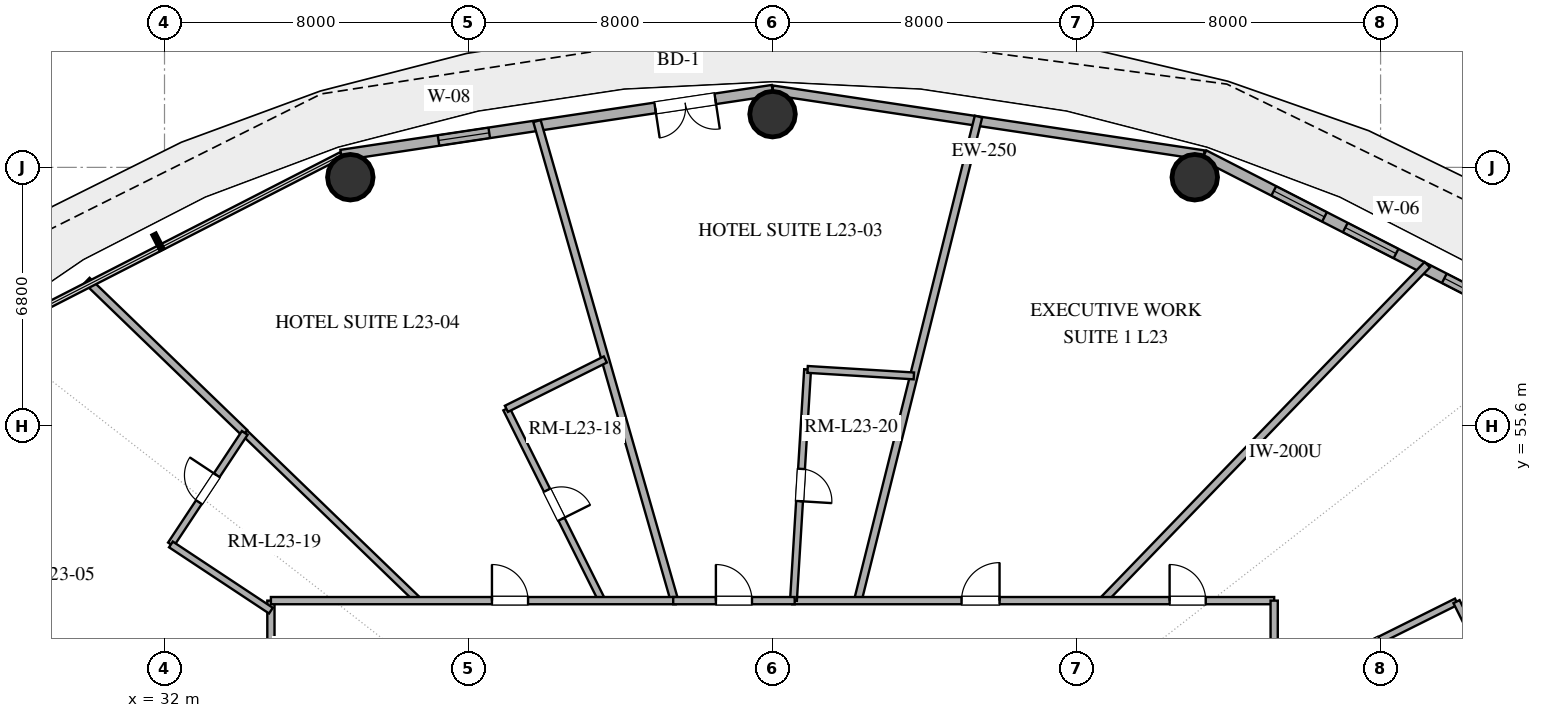
"""IFC4 building model, lengths in metres.
Left out: names, types, materials, properties, quantities, classifications, styles, units other than length and angle.
Written with IfcOpenShell. Run it as: python <this file> out.ifc"""

import sys

from ifc_helpers import new_model, si_unit, direction, frame, frame_2d, origin, origin_2d, place, context, subcontext, project, spatial, rectangle, hollow_circle, extrude, element, fill, save


model = new_model("IFC4")
c1 = context("Model", 3, precision=1e-05, world=origin(), true_north=direction((0.0, 1.0)))
c2 = subcontext(c1, "Body", "Model", "MODEL_VIEW")
j1 = project(units=[si_unit("LENGTHUNIT", "METRE"), si_unit("PLANEANGLEUNIT", "RADIAN")], contexts=[c1])
p1 = place(None, origin())
s1 = spatial("IfcSite", under=j1, at=p1, CompositionType="ELEMENT")
p2 = place(p1, origin())
s2 = spatial("IfcBuilding", under=s1, at=p2, CompositionType="ELEMENT")
p3 = place(p2, frame((0.0, 0.0, 94.8)))
s3 = spatial("IfcBuildingStorey", under=s2, at=p3, CompositionType="ELEMENT", Elevation=94.8)
for number, where, z_axis, x_axis in (
    (1, (59.11, 62.141, 0.0), (0.0, 0.0, 1.0), (1.0, 0.0, 0.0)),
    (2, (48.0, 63.8, 0.0), (0.0, 0.0, 1.0), (1.0, 0.0, 0.0)),
    (3, (36.89, 62.141, 0.0), (0.0, 0.0, 1.0), (1.0, 0.0, 0.0)),
):
    element("IfcColumn", number, at=place(p3, frame(where, z_axis=z_axis, x_axis=x_axis)), inside=s3, PredefinedType="COLUMN", context=c2, shape_type="SweptSolid", body=[
        extrude(hollow_circle(Radius=0.6, WallThickness=0.032, at=origin_2d()), origin(), (0.0, 0.0, 1.0), 3.38),
    ])
p4 = place(p3, frame((68.84, 57.86, 0.0), z_axis=(0.0, 0.0, 1.0), x_axis=(-0.889959505023, 0.45603955905, 0.0)))
e4 = element("IfcWall", 4, at=p4, inside=s3, PredefinedType="SOLIDWALL", context=c2, shape_type="SweptSolid", body=[
    extrude(rectangle(XDim=10.662, YDim=0.28, at=frame_2d((5.331, 0.0))), origin(), (0.0, 0.0, 1.0), 3.38),
])
p5 = place(p4, frame((1.904, 0.0, 0.85)))
e5 = element("IfcOpeningElement", 5, at=p5, cuts=e4, PredefinedType="OPENING", context=c2, shape_type="SweptSolid", body=[
    extrude(rectangle(XDim=1.65, YDim=2.0, at=frame_2d((0.825, 1.0))), frame((0.0, 0.15, 0.0), z_axis=(0.0, -1.0, 0.0), x_axis=(1.0, 0.0, 0.0)), (0.0, 0.0, 1.0), 0.3),
])
p6 = place(p4, frame((4.982, 0.0, 0.85)))
e6 = element("IfcOpeningElement", 6, at=p6, cuts=e4, PredefinedType="OPENING", context=c2, shape_type="SweptSolid", body=[
    extrude(rectangle(XDim=1.5, YDim=2.0, at=frame_2d((0.75, 1.0))), frame((0.0, 0.15, 0.0), z_axis=(0.0, -1.0, 0.0), x_axis=(1.0, 0.0, 0.0)), (0.0, 0.0, 1.0), 0.3),
])
p7 = place(p4, frame((7.096, 0.0, 0.85)))
e7 = element("IfcOpeningElement", 7, at=p7, cuts=e4, PredefinedType="OPENING", context=c2, shape_type="SweptSolid", body=[
    extrude(rectangle(XDim=1.5, YDim=2.0, at=frame_2d((0.75, 1.0))), frame((0.0, 0.15, 0.0), z_axis=(0.0, -1.0, 0.0), x_axis=(1.0, 0.0, 0.0)), (0.0, 0.0, 1.0), 0.3),
])
p8 = place(p3, frame((59.351, 62.723, 0.0), z_axis=(0.0, 0.0, 1.0), x_axis=(-0.988877774656, 0.148730450117, 0.0)))
e8 = element("IfcWall", 8, at=p8, inside=s3, PredefinedType="SOLIDWALL", context=c2, shape_type="SweptSolid", body=[
    extrude(rectangle(XDim=11.479, YDim=0.25, at=frame_2d((5.74, 0.0))), origin(), (0.0, 0.0, 1.0), 3.38),
])
p9 = place(p3, frame((48.0, 64.43, 0.0), z_axis=(0.0, 0.0, 1.0), x_axis=(-0.988877774656, -0.148730450117, 0.0)))
e9 = element("IfcWall", 9, at=p9, inside=s3, PredefinedType="SOLIDWALL", context=c2, shape_type="SweptSolid", body=[
    extrude(rectangle(XDim=11.479, YDim=0.28, at=frame_2d((5.74, 0.0))), origin(), (0.0, 0.0, 1.0), 3.38),
])
p10 = place(p9, frame((1.524, 0.0, 0.0)))
e10 = element("IfcOpeningElement", 10, at=p10, cuts=e9, PredefinedType="OPENING", context=c2, shape_type="SweptSolid", body=[
    extrude(rectangle(XDim=1.6, YDim=2.25, at=frame_2d((0.8, 1.125))), frame((0.0, 0.15, 0.0), z_axis=(0.0, -1.0, 0.0), x_axis=(1.0, 0.0, 0.0)), (0.0, 0.0, 1.0), 0.3),
])
p11 = place(p9, frame((7.539, 0.0, 0.85)))
e11 = element("IfcOpeningElement", 11, at=p11, cuts=e9, PredefinedType="OPENING", context=c2, shape_type="SweptSolid", body=[
    extrude(rectangle(XDim=1.35, YDim=1.8, at=frame_2d((0.675, 0.9))), frame((0.0, 0.15, 0.0), z_axis=(0.0, -1.0, 0.0), x_axis=(1.0, 0.0, 0.0)), (0.0, 0.0, 1.0), 0.3),
])
p12 = place(p3, frame((65.228, 59.84, 0.0), z_axis=(0.0, 0.0, 1.0), x_axis=(-0.694672506389, -0.719326149161, 0.0)))
e12 = element("IfcWall", 12, at=p12, inside=s3, PredefinedType="PARTITIONING", context=c2, shape_type="SweptSolid", body=[
    extrude(rectangle(XDim=12.289, YDim=0.2, at=frame_2d((6.145, 0.0))), origin(), (0.0, 0.0, 1.0), 2.74),
])
p13 = place(p3, frame((50.244, 51.0, 0.0), z_axis=(0.0, 0.0, 1.0), x_axis=(0.241918476077, 0.970296578852, 0.0)))
e13 = element("IfcWall", 13, at=p13, inside=s3, PredefinedType="PARTITIONING", context=c2, shape_type="SweptSolid", body=[
    extrude(rectangle(XDim=13.125, YDim=0.2, at=frame_2d((6.563, 0.0))), origin(), (0.0, 0.0, 1.0), 2.74),
])
p14 = place(p3, frame((45.419, 51.0, 0.0), z_axis=(0.0, 0.0, 1.0), x_axis=(-0.275639731411, 0.961261014745, 0.0)))
e14 = element("IfcWall", 14, at=p14, inside=s3, PredefinedType="PARTITIONING", context=c2, shape_type="SweptSolid", body=[
    extrude(rectangle(XDim=13.126, YDim=0.2, at=frame_2d((6.563, 0.0))), origin(), (0.0, 0.0, 1.0), 2.74),
])
p15 = place(p3, frame((48.518, 51.0, 0.0), z_axis=(0.0, 0.0, 1.0), x_axis=(1.0, 0.0, 0.0)))
e15 = element("IfcWall", 15, at=p15, inside=s3, PredefinedType="PARTITIONING", context=c2, shape_type="SweptSolid", body=[
    extrude(rectangle(XDim=12.682, YDim=0.19, at=frame_2d((6.341, 0.0))), origin(), (0.0, 0.0, 1.0), 2.74),
])
p16 = place(p15, frame((4.455, 0.0, 0.0)))
e16 = element("IfcOpeningElement", 16, at=p16, cuts=e15, PredefinedType="OPENING", context=c2, shape_type="SweptSolid", body=[
    extrude(rectangle(XDim=1.0, YDim=2.2, at=frame_2d((0.5, 1.1))), frame((0.0, 0.105, 0.0), z_axis=(0.0, -1.0, 0.0), x_axis=(1.0, 0.0, 0.0)), (0.0, 0.0, 1.0), 0.21),
])
p17 = place(p15, frame((9.93, 0.0, 0.0)))
e17 = element("IfcOpeningElement", 17, at=p17, cuts=e15, PredefinedType="OPENING", context=c2, shape_type="SweptSolid", body=[
    extrude(rectangle(XDim=0.95, YDim=2.15, at=frame_2d((0.475, 1.075))), frame((0.0, 0.105, 0.0), z_axis=(0.0, -1.0, 0.0), x_axis=(1.0, 0.0, 0.0)), (0.0, 0.0, 1.0), 0.21),
])
p18 = place(p3, frame((34.111, 55.413, 0.0), z_axis=(0.0, 0.0, 1.0), x_axis=(0.719318009274, -0.694680935059, 0.0)))
e18 = element("IfcWall", 18, at=p18, inside=s3, PredefinedType="PLUMBINGWALL", context=c2, shape_type="SweptSolid", body=[
    extrude(rectangle(XDim=6.352, YDim=0.18, at=frame_2d((3.176, 0.0))), origin(), (0.0, 0.0, 1.0), 2.74),
])
p19 = place(p3, frame((48.923, 57.084, 0.0), z_axis=(0.0, 0.0, 1.0), x_axis=(-0.061044096749, -0.998135070144, 0.0)))
e19 = element("IfcWall", 19, at=p19, inside=s3, PredefinedType="PLUMBINGWALL", context=c2, shape_type="SweptSolid", body=[
    extrude(rectangle(XDim=6.095, YDim=0.18, at=frame_2d((3.048, 0.0))), origin(), (0.0, 0.0, 1.0), 2.74),
])
p20 = place(p19, frame((2.623, 0.0, 0.0)))
e20 = element("IfcOpeningElement", 20, at=p20, cuts=e19, PredefinedType="OPENING", context=c2, shape_type="SweptSolid", body=[
    extrude(rectangle(XDim=0.85, YDim=2.1, at=frame_2d((0.425, 1.05))), frame((0.0, 0.1, 0.0), z_axis=(0.0, -1.0, 0.0), x_axis=(1.0, 0.0, 0.0)), (0.0, 0.0, 1.0), 0.2),
])
p21 = place(p3, frame((29.959, 59.422, 0.0), z_axis=(0.0, 0.0, 1.0), x_axis=(0.719370121813, -0.694626970281, 0.0)))
e21 = element("IfcWall", 21, at=p21, inside=s3, PredefinedType="PARTITIONING", context=c2, shape_type="SweptSolid", body=[
    extrude(rectangle(XDim=5.772, YDim=0.2, at=frame_2d((2.886, 0.0))), origin(), (0.0, 0.0, 1.0), 2.74),
])
p22 = place(p3, frame((40.997, 56.047, 0.0), z_axis=(0.0, 0.0, 1.0), x_axis=(0.446174269641, -0.894946099556, 0.0)))
e22 = element("IfcWall", 22, at=p22, inside=s3, PredefinedType="PLUMBINGWALL", context=c2, shape_type="SweptSolid", body=[
    extrude(rectangle(XDim=5.639, YDim=0.18, at=frame_2d((2.82, 0.0))), origin(), (0.0, 0.0, 1.0), 2.74),
])
p23 = place(p22, frame((2.395, 0.0, 0.0)))
e23 = element("IfcOpeningElement", 23, at=p23, cuts=e22, PredefinedType="OPENING", context=c2, shape_type="SweptSolid", body=[
    extrude(rectangle(XDim=0.85, YDim=2.1, at=frame_2d((0.425, 1.05))), frame((0.0, 0.1, 0.0), z_axis=(0.0, -1.0, 0.0), x_axis=(1.0, 0.0, 0.0)), (0.0, 0.0, 1.0), 0.2),
])
p24 = place(p3, frame((34.8, 42.775, 0.0), z_axis=(0.0, 0.0, 1.0), x_axis=(0.0, 1.0, 0.0)))
e24 = element("IfcWall", 24, at=p24, inside=s3, PredefinedType="PARTITIONING", context=c2, shape_type="SweptSolid", body=[
    extrude(rectangle(XDim=8.225, YDim=0.19, at=frame_2d((4.112, 0.0))), origin(), (0.0, 0.0, 1.0), 2.74),
])
p25 = place(p24, frame((4.767, 0.0, 0.0)))
e25 = element("IfcOpeningElement", 25, at=p25, cuts=e24, PredefinedType="OPENING", context=c2, shape_type="SweptSolid", body=[
    extrude(rectangle(XDim=0.95, YDim=2.15, at=frame_2d((0.475, 1.075))), frame((0.0, 0.105, 0.0), z_axis=(0.0, -1.0, 0.0), x_axis=(1.0, 0.0, 0.0)), (0.0, 0.0, 1.0), 0.21),
])
p26 = place(p3, frame((65.998, 50.973, 0.0), z_axis=(0.0, 0.0, 1.0), x_axis=(-0.894936648514, -0.446193226244, 0.0)))
e26 = element("IfcWall", 26, at=p26, inside=s3, PredefinedType="PLUMBINGWALL", context=c2, shape_type="SweptSolid", body=[
    extrude(rectangle(XDim=5.361, YDim=0.18, at=frame_2d((2.681, 0.0))), origin(), (0.0, 0.0, 1.0), 2.74),
])
p27 = place(p26, frame((2.256, 0.0, 0.0)))
e27 = element("IfcOpeningElement", 27, at=p27, cuts=e26, PredefinedType="OPENING", context=c2, shape_type="SweptSolid", body=[
    extrude(rectangle(XDim=0.85, YDim=2.1, at=frame_2d((0.425, 1.05))), frame((0.0, 0.1, 0.0), z_axis=(0.0, -1.0, 0.0), x_axis=(1.0, 0.0, 0.0)), (0.0, 0.0, 1.0), 0.2),
])
p28 = place(p3, frame((34.8, 51.0, 0.0), z_axis=(0.0, 0.0, 1.0), x_axis=(1.0, 0.0, 0.0)))
e28 = element("IfcWall", 28, at=p28, inside=s3, PredefinedType="PARTITIONING", context=c2, shape_type="SweptSolid", body=[
    extrude(rectangle(XDim=10.653, YDim=0.19, at=frame_2d((5.326, 0.0))), origin(), (0.0, 0.0, 1.0), 2.74),
])
p29 = place(p28, frame((5.816, 0.0, 0.0)))
e29 = element("IfcOpeningElement", 29, at=p29, cuts=e28, PredefinedType="OPENING", context=c2, shape_type="SweptSolid", body=[
    extrude(rectangle(XDim=0.95, YDim=2.15, at=frame_2d((0.475, 1.075))), frame((0.0, 0.105, 0.0), z_axis=(0.0, -1.0, 0.0), x_axis=(1.0, 0.0, 0.0)), (0.0, 0.0, 1.0), 0.21),
])
p30 = place(p3, frame((61.2, 51.0, 0.0), z_axis=(0.0, 0.0, 1.0), x_axis=(0.0, -1.0, 0.0)))
e30 = element("IfcWall", 30, at=p30, inside=s3, PredefinedType="PARTITIONING", context=c2, shape_type="SweptSolid", body=[
    extrude(rectangle(XDim=9.839, YDim=0.19, at=frame_2d((4.92, 0.0))), origin(), (0.0, 0.0, 1.0), 2.74),
])
p31 = place(p30, frame((7.035, 0.0, 0.0)))
e31 = element("IfcOpeningElement", 31, at=p31, cuts=e30, PredefinedType="OPENING", context=c2, shape_type="SweptSolid", body=[
    extrude(rectangle(XDim=0.95, YDim=2.15, at=frame_2d((0.475, 1.075))), frame((0.0, 0.105, 0.0), z_axis=(0.0, -1.0, 0.0), x_axis=(1.0, 0.0, 0.0)), (0.0, 0.0, 1.0), 0.21),
])
p32 = place(p3, frame((67.661, 47.638, 0.0), z_axis=(0.0, 0.0, 1.0), x_axis=(-0.446243949247, 0.894911357488, 0.0)))
e32 = element("IfcWall", 32, at=p32, inside=s3, PredefinedType="PLUMBINGWALL", context=c2, shape_type="SweptSolid", body=[
    extrude(rectangle(XDim=3.727, YDim=0.18, at=frame_2d((1.864, 0.0))), origin(), (0.0, 0.0, 1.0), 2.74),
])
p33 = place(p3, frame((32.169, 52.479, 0.0), z_axis=(0.0, 0.0, 1.0), x_axis=(0.551959146688, 0.833871153349, 0.0)))
e33 = element("IfcWall", 33, at=p33, inside=s3, PredefinedType="PLUMBINGWALL", context=c2, shape_type="SweptSolid", body=[
    extrude(rectangle(XDim=3.519, YDim=0.18, at=frame_2d((1.759, 0.0))), origin(), (0.0, 0.0, 1.0), 2.74),
])
p34 = place(p33, frame((1.334, 0.0, 0.0)))
e34 = element("IfcOpeningElement", 34, at=p34, cuts=e33, PredefinedType="OPENING", context=c2, shape_type="SweptSolid", body=[
    extrude(rectangle(XDim=0.85, YDim=2.1, at=frame_2d((0.425, 1.05))), frame((0.0, 0.1, 0.0), z_axis=(0.0, -1.0, 0.0), x_axis=(1.0, 0.0, 0.0)), (0.0, 0.0, 1.0), 0.2),
])
p35 = place(p3, frame((45.386, 51.0, 0.0), z_axis=(0.0, 0.0, 1.0), x_axis=(1.0, 0.0, 0.0)))
e35 = element("IfcWall", 35, at=p35, inside=s3, PredefinedType="PARTITIONING", context=c2, shape_type="SweptSolid", body=[
    extrude(rectangle(XDim=3.197, YDim=0.19, at=frame_2d((1.598, 0.0))), origin(), (0.0, 0.0, 1.0), 2.74),
])
p36 = place(p35, frame((1.123, 0.0, 0.0)))
e36 = element("IfcOpeningElement", 36, at=p36, cuts=e35, PredefinedType="OPENING", context=c2, shape_type="SweptSolid", body=[
    extrude(rectangle(XDim=0.95, YDim=2.15, at=frame_2d((0.475, 1.075))), frame((0.0, 0.105, 0.0), z_axis=(0.0, -1.0, 0.0), x_axis=(1.0, 0.0, 0.0)), (0.0, 0.0, 1.0), 0.21),
])
p37 = place(p3, frame((34.8, 50.737, 0.0), z_axis=(0.0, 0.0, 1.0), x_axis=(-0.833855219674, 0.5519832177, 0.0)))
e37 = element("IfcWall", 37, at=p37, inside=s3, PredefinedType="PLUMBINGWALL", context=c2, shape_type="SweptSolid", body=[
    extrude(rectangle(XDim=3.155, YDim=0.18, at=frame_2d((1.578, 0.0))), origin(), (0.0, 0.0, 1.0), 2.74),
])
p38 = place(p3, frame((43.6, 57.345, 0.0), z_axis=(0.0, 0.0, 1.0), x_axis=(-0.894913437672, -0.446239777558, 0.0)))
e38 = element("IfcWall", 38, at=p38, inside=s3, PredefinedType="PLUMBINGWALL", context=c2, shape_type="SweptSolid", body=[
    extrude(rectangle(XDim=2.909, YDim=0.18, at=frame_2d((1.455, 0.0))), origin(), (0.0, 0.0, 1.0), 2.74),
])
p39 = place(p3, frame((51.718, 56.913, 0.0), z_axis=(0.0, 0.0, 1.0), x_axis=(-0.998136779925, 0.061016133608, 0.0)))
e39 = element("IfcWall", 39, at=p39, inside=s3, PredefinedType="PLUMBINGWALL", context=c2, shape_type="SweptSolid", body=[
    extrude(rectangle(XDim=2.801, YDim=0.18, at=frame_2d((1.4, 0.0))), origin(), (0.0, 0.0, 1.0), 2.74),
])
p40 = place(p5, origin())
e40 = element("IfcWindow", 40, at=p40, inside=s3, PartitioningType="SINGLE_PANEL", PredefinedType="WINDOW", context=c2, shape_type="SweptSolid", body=[
    extrude(rectangle(XDim=1.65, YDim=2.0, at=frame_2d((0.825, 1.0))), frame((0.0, 0.03, 0.0), z_axis=(0.0, -1.0, 0.0), x_axis=(1.0, 0.0, 0.0)), (0.0, 0.0, 1.0), 0.06),
])
fill(e5, e40)
p41 = place(p6, origin())
e41 = element("IfcWindow", 41, at=p41, inside=s3, PartitioningType="SINGLE_PANEL", PredefinedType="WINDOW", context=c2, shape_type="SweptSolid", body=[
    extrude(rectangle(XDim=1.5, YDim=2.0, at=frame_2d((0.75, 1.0))), frame((0.0, 0.03, 0.0), z_axis=(0.0, -1.0, 0.0), x_axis=(1.0, 0.0, 0.0)), (0.0, 0.0, 1.0), 0.06),
])
fill(e6, e41)
p42 = place(p7, origin())
e42 = element("IfcWindow", 42, at=p42, inside=s3, PartitioningType="SINGLE_PANEL", PredefinedType="WINDOW", context=c2, shape_type="SweptSolid", body=[
    extrude(rectangle(XDim=1.5, YDim=2.0, at=frame_2d((0.75, 1.0))), frame((0.0, 0.03, 0.0), z_axis=(0.0, -1.0, 0.0), x_axis=(1.0, 0.0, 0.0)), (0.0, 0.0, 1.0), 0.06),
])
fill(e7, e42)
p43 = place(p10, origin())
e43 = element("IfcDoor", 43, at=p43, inside=s3, OperationType="DOUBLE_DOOR_SINGLE_SWING", PredefinedType="DOOR", context=c2, shape_type="SweptSolid", body=[
    extrude(rectangle(XDim=1.6, YDim=2.25, at=frame_2d((0.8, 1.125))), frame((0.0, 0.025, 0.0), z_axis=(0.0, -1.0, 0.0), x_axis=(1.0, 0.0, 0.0)), (0.0, 0.0, 1.0), 0.05),
])
fill(e10, e43)
p44 = place(p11, origin())
e44 = element("IfcWindow", 44, at=p44, inside=s3, PartitioningType="SINGLE_PANEL", PredefinedType="WINDOW", context=c2, shape_type="SweptSolid", body=[
    extrude(rectangle(XDim=1.35, YDim=1.8, at=frame_2d((0.675, 0.9))), frame((0.0, 0.03, 0.0), z_axis=(0.0, -1.0, 0.0), x_axis=(1.0, 0.0, 0.0)), (0.0, 0.0, 1.0), 0.06),
])
fill(e11, e44)
p45 = place(p16, origin())
e45 = element("IfcDoor", 45, at=p45, inside=s3, OperationType="SINGLE_SWING_RIGHT", PredefinedType="DOOR", context=c2, shape_type="SweptSolid", body=[
    extrude(rectangle(XDim=1.0, YDim=2.2, at=frame_2d((0.5, 1.1))), frame((0.0, 0.025, 0.0), z_axis=(0.0, -1.0, 0.0), x_axis=(1.0, 0.0, 0.0)), (0.0, 0.0, 1.0), 0.05),
])
fill(e16, e45)
p46 = place(p17, origin())
e46 = element("IfcDoor", 46, at=p46, inside=s3, OperationType="SINGLE_SWING_LEFT", PredefinedType="DOOR", context=c2, shape_type="SweptSolid", body=[
    extrude(rectangle(XDim=0.95, YDim=2.15, at=frame_2d((0.475, 1.075))), frame((0.0, 0.025, 0.0), z_axis=(0.0, -1.0, 0.0), x_axis=(1.0, 0.0, 0.0)), (0.0, 0.0, 1.0), 0.05),
])
fill(e17, e46)
p47 = place(p20, origin())
e47 = element("IfcDoor", 47, at=p47, inside=s3, OperationType="SINGLE_SWING_RIGHT", PredefinedType="DOOR", context=c2, shape_type="SweptSolid", body=[
    extrude(rectangle(XDim=0.85, YDim=2.1, at=frame_2d((0.425, 1.05))), frame((0.0, 0.025, 0.0), z_axis=(0.0, -1.0, 0.0), x_axis=(1.0, 0.0, 0.0)), (0.0, 0.0, 1.0), 0.05),
])
fill(e20, e47)
p48 = place(p23, origin())
e48 = element("IfcDoor", 48, at=p48, inside=s3, OperationType="SINGLE_SWING_RIGHT", PredefinedType="DOOR", context=c2, shape_type="SweptSolid", body=[
    extrude(rectangle(XDim=0.85, YDim=2.1, at=frame_2d((0.425, 1.05))), frame((0.0, 0.025, 0.0), z_axis=(0.0, -1.0, 0.0), x_axis=(1.0, 0.0, 0.0)), (0.0, 0.0, 1.0), 0.05),
])
fill(e23, e48)
p49 = place(p29, origin())
e49 = element("IfcDoor", 49, at=p49, inside=s3, OperationType="SINGLE_SWING_LEFT", PredefinedType="DOOR", context=c2, shape_type="SweptSolid", body=[
    extrude(rectangle(XDim=0.95, YDim=2.15, at=frame_2d((0.475, 1.075))), frame((0.0, 0.025, 0.0), z_axis=(0.0, -1.0, 0.0), x_axis=(1.0, 0.0, 0.0)), (0.0, 0.0, 1.0), 0.05),
])
fill(e29, e49)
p50 = place(p34, origin())
e50 = element("IfcDoor", 50, at=p50, inside=s3, OperationType="SINGLE_SWING_RIGHT", PredefinedType="DOOR", context=c2, shape_type="SweptSolid", body=[
    extrude(rectangle(XDim=0.85, YDim=2.1, at=frame_2d((0.425, 1.05))), frame((0.0, 0.025, 0.0), z_axis=(0.0, -1.0, 0.0), x_axis=(1.0, 0.0, 0.0)), (0.0, 0.0, 1.0), 0.05),
])
fill(e34, e50)
p51 = place(p36, origin())
e51 = element("IfcDoor", 51, at=p51, inside=s3, OperationType="SINGLE_SWING_LEFT", PredefinedType="DOOR", context=c2, shape_type="SweptSolid", body=[
    extrude(rectangle(XDim=0.95, YDim=2.15, at=frame_2d((0.475, 1.075))), frame((0.0, 0.025, 0.0), z_axis=(0.0, -1.0, 0.0), x_axis=(1.0, 0.0, 0.0)), (0.0, 0.0, 1.0), 0.05),
])
fill(e36, e51)
save(model, sys.argv[1])
